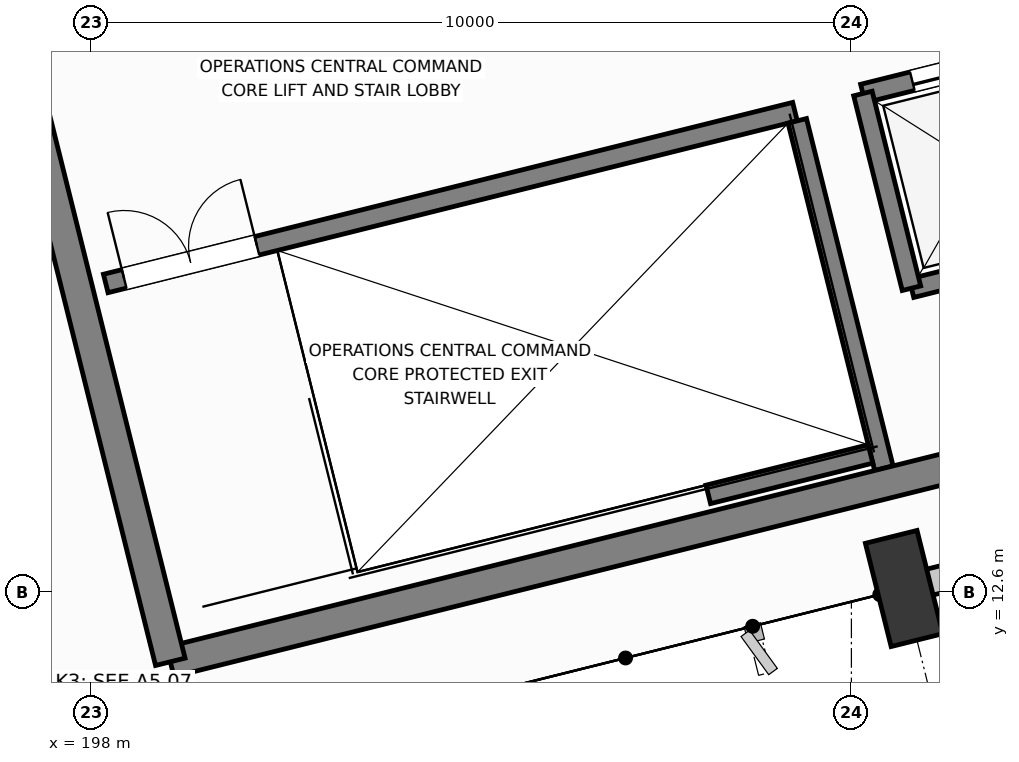
"""IFC4 building model, lengths in metres.
Left out: names, types, materials, properties, quantities, classifications, styles, units other than length and angle.
Written with IfcOpenShell. Run it as: python <this file> out.ifc"""

import sys

from ifc_helpers import new_model, si_unit, direction, frame, frame_2d, origin, origin_2d, place, context, subcontext, project, spatial, rectangle, extrude, element, fill, save


model = new_model("IFC4")
c1 = context("Model", 3, precision=1e-05, world=origin(), true_north=direction((0.0, 1.0)))
c2 = subcontext(c1, "Body", "Model", "MODEL_VIEW")
j1 = project(units=[si_unit("LENGTHUNIT", "METRE"), si_unit("PLANEANGLEUNIT", "RADIAN")], contexts=[c1])
p1 = place(None, origin())
s1 = spatial("IfcSite", under=j1, at=p1, CompositionType="ELEMENT")
p2 = place(p1, origin())
s2 = spatial("IfcBuilding", under=s1, at=p2, CompositionType="ELEMENT")
p3 = place(p2, frame((0.0, 0.0, 24.6)))
s3 = spatial("IfcBuildingStorey", under=s2, at=p3, CompositionType="ELEMENT", Elevation=24.6)
p4 = place(p3, frame((208.693, 12.645, 0.0), z_axis=(0.0, 0.0, 1.0), x_axis=(0.970295726276, 0.2419218956, 0.0)))
e1 = element("IfcColumn", 1, at=p4, inside=s3, PredefinedType="COLUMN", context=c2, shape_type="SweptSolid", body=[
    extrude(rectangle(XDim=0.7, YDim=1.4, at=origin_2d()), origin(), (0.0, 0.0, 1.0), 4.2),
])
p5 = place(p3, frame((208.999, 12.721, 0.0), z_axis=(0.0, 0.0, 1.0), x_axis=(0.970297165187, 0.241916124371, 0.0)))
e2 = element("IfcWall", 2, at=p5, inside=s3, PredefinedType="STANDARD", context=c2, shape_type="SweptSolid", body=[
    extrude(rectangle(XDim=10.37, YDim=0.35, at=frame_2d((5.185, 0.0))), origin(), (0.0, 0.0, 1.0), 3.575),
])
p6 = place(p5, frame((1.692, 0.0, 0.85)))
e3 = element("IfcOpeningElement", 3, at=p6, cuts=e2, PredefinedType="OPENING", context=c2, shape_type="SweptSolid", body=[
    extrude(rectangle(XDim=1.8, YDim=1.65, at=frame_2d((0.9, 0.825))), frame((0.0, 0.185, 0.0), z_axis=(0.0, -1.0, 0.0), x_axis=(1.0, 0.0, 0.0)), (0.0, 0.0, 1.0), 0.37),
])
p7 = place(p5, frame((6.877, 0.0, 0.85)))
e4 = element("IfcOpeningElement", 4, at=p7, cuts=e2, PredefinedType="OPENING", context=c2, shape_type="SweptSolid", body=[
    extrude(rectangle(XDim=1.8, YDim=1.65, at=frame_2d((0.9, 0.825))), frame((0.0, 0.185, 0.0), z_axis=(0.0, -1.0, 0.0), x_axis=(1.0, 0.0, 0.0)), (0.0, 0.0, 1.0), 0.37),
])
p8 = place(p3, frame((208.79, 16.595, 0.0), z_axis=(0.0, 0.0, 1.0), x_axis=(0.97029284861, 0.241933436994, 0.0)))
e5 = element("IfcWall", 5, at=p8, inside=s3, PredefinedType="SOLIDWALL", context=c2, shape_type="SweptSolid", body=[
    extrude(rectangle(XDim=2.54, YDim=0.25, at=frame_2d((1.27, 0.0))), origin(), (0.0, 0.0, 1.0), 3.98),
])
p9 = place(p3, frame((210.616, 19.771, 0.0), z_axis=(0.0, 0.0, 1.0), x_axis=(-0.97029284861, -0.241933436994, 0.0)))
e6 = element("IfcWall", 6, at=p9, inside=s3, PredefinedType="SOLIDWALL", context=c2, shape_type="SweptSolid", body=[
    extrude(rectangle(XDim=2.54, YDim=0.25, at=frame_2d((1.27, 0.0))), origin(), (0.0, 0.0, 1.0), 3.98),
])
p10 = place(p9, frame((0.67, 0.0, 0.0)))
e7 = element("IfcOpeningElement", 7, at=p10, cuts=e6, PredefinedType="OPENING", context=c2, shape_type="SweptSolid", body=[
    extrude(rectangle(XDim=1.2, YDim=2.2, at=frame_2d((0.6, 1.1))), frame((0.0, 0.135, 0.0), z_axis=(0.0, -1.0, 0.0), x_axis=(1.0, 0.0, 0.0)), (0.0, 0.0, 1.0), 0.27),
])
p11 = place(p3, frame((208.151, 19.157, 0.0), z_axis=(0.0, 0.0, 1.0), x_axis=(0.241938414856, -0.970291607413, 0.0)))
e8 = element("IfcWall", 8, at=p11, inside=s3, PredefinedType="SOLIDWALL", context=c2, shape_type="SweptSolid", body=[
    extrude(rectangle(XDim=2.64, YDim=0.25, at=frame_2d((1.32, 0.0))), origin(), (0.0, 0.0, 1.0), 3.98),
])
p12 = place(p3, frame((198.19, 16.658, 0.0), z_axis=(0.0, 0.0, 1.0), x_axis=(0.970297151331, 0.241916179943, 0.0)))
e9 = element("IfcWall", 9, at=p12, inside=s3, PredefinedType="SOLIDWALL", context=c2, shape_type="SweptSolid", body=[
    extrude(rectangle(XDim=9.345, YDim=0.25, at=frame_2d((4.673, 0.0))), origin(), (0.0, 0.0, 1.0), 3.98),
])
p13 = place(p12, frame((0.25, 0.0, 0.0)))
e10 = element("IfcOpeningElement", 10, at=p13, cuts=e9, PredefinedType="OPENING", context=c2, shape_type="SweptSolid", body=[
    extrude(rectangle(XDim=1.8, YDim=2.25, at=frame_2d((0.9, 1.125))), frame((0.0, 0.135, 0.0), z_axis=(0.0, -1.0, 0.0), x_axis=(1.0, 0.0, 0.0)), (0.0, 0.0, 1.0), 0.27),
])
p14 = place(p3, frame((208.427, 14.227, 0.0), z_axis=(0.0, 0.0, 1.0), x_axis=(-0.241911120435, 0.970298412763, 0.0)))
e11 = element("IfcWall", 11, at=p14, inside=s3, PredefinedType="SOLIDWALL", context=c2, shape_type="SweptSolid", body=[
    extrude(rectangle(XDim=4.71, YDim=0.25, at=frame_2d((2.355, 0.0))), origin(), (0.0, 0.0, 1.0), 3.98),
])
p15 = place(p3, frame((206.117, 13.883, 0.0), z_axis=(0.0, 0.0, 1.0), x_axis=(0.97029738597, 0.241915238833, 0.0)))
e12 = element("IfcWall", 12, at=p15, inside=s3, PredefinedType="SOLIDWALL", context=c2, shape_type="SweptSolid", body=[
    extrude(rectangle(XDim=2.2, YDim=0.25, at=frame_2d((1.1, 0.0))), origin(), (0.0, 0.0, 1.0), 3.98),
])
p16 = place(p3, frame((199.04, 11.681, 0.0), z_axis=(0.0, 0.0, 1.0), x_axis=(0.970295578967, 0.241922486422, 0.0)))
e13 = element("IfcWall", 13, at=p16, inside=s3, PredefinedType="SHEAR", context=c2, shape_type="SweptSolid", body=[
    extrude(rectangle(XDim=14.2, YDim=0.4, at=frame_2d((7.1, 0.0))), origin(), (0.0, 0.0, 1.0), 3.98),
])
p17 = place(p3, frame((196.862, 20.413, 0.0), z_axis=(0.0, 0.0, 1.0), x_axis=(0.241921199913, -0.97029589973, 0.0)))
e14 = element("IfcWall", 14, at=p17, inside=s3, PredefinedType="SHEAR", context=c2, shape_type="SweptSolid", body=[
    extrude(rectangle(XDim=9.0, YDim=0.4, at=frame_2d((4.5, 0.0))), origin(), (0.0, 0.0, 1.0), 3.98),
])
p18 = place(p3, frame((204.773, 26.714, 0.0), z_axis=(0.0, 0.0, 1.0), x_axis=(-0.970295576517, -0.241922496248, 0.0)))
e15 = element("IfcWall", 15, at=p18, inside=s3, PredefinedType="PARTITIONING", context=c2, shape_type="SweptSolid", body=[
    extrude(rectangle(XDim=32.2, YDim=0.2, at=frame_2d((16.1, 0.0))), origin(), (0.0, 0.0, 1.0), 3.225),
])
p19 = place(p18, frame((15.2, 0.0, 0.0)))
e16 = element("IfcOpeningElement", 16, at=p19, cuts=e15, PredefinedType="OPENING", context=c2, shape_type="SweptSolid", body=[
    extrude(rectangle(XDim=1.8, YDim=2.25, at=frame_2d((0.9, 1.125))), frame((0.0, 0.11, 0.0), z_axis=(0.0, -1.0, 0.0), x_axis=(1.0, 0.0, 0.0)), (0.0, 0.0, 1.0), 0.22),
])
p20 = place(p10, origin())
e17 = element("IfcDoor", 17, at=p20, inside=s3, OperationType="SLIDING_TO_LEFT", PredefinedType="DOOR", context=c2, shape_type="SweptSolid", body=[
    extrude(rectangle(XDim=1.2, YDim=2.2, at=frame_2d((0.6, 1.1))), frame((0.0, 0.025, 0.0), z_axis=(0.0, -1.0, 0.0), x_axis=(1.0, 0.0, 0.0)), (0.0, 0.0, 1.0), 0.05),
])
fill(e7, e17)
p21 = place(p13, origin())
e18 = element("IfcDoor", 18, at=p21, inside=s3, OperationType="DOUBLE_DOOR_SINGLE_SWING", PredefinedType="DOOR", context=c2, shape_type="SweptSolid", body=[
    extrude(rectangle(XDim=1.8, YDim=2.25, at=frame_2d((0.9, 1.125))), frame((0.0, 0.025, 0.0), z_axis=(0.0, -1.0, 0.0), x_axis=(1.0, 0.0, 0.0)), (0.0, 0.0, 1.0), 0.05),
])
fill(e10, e18)
save(model, sys.argv[1])
